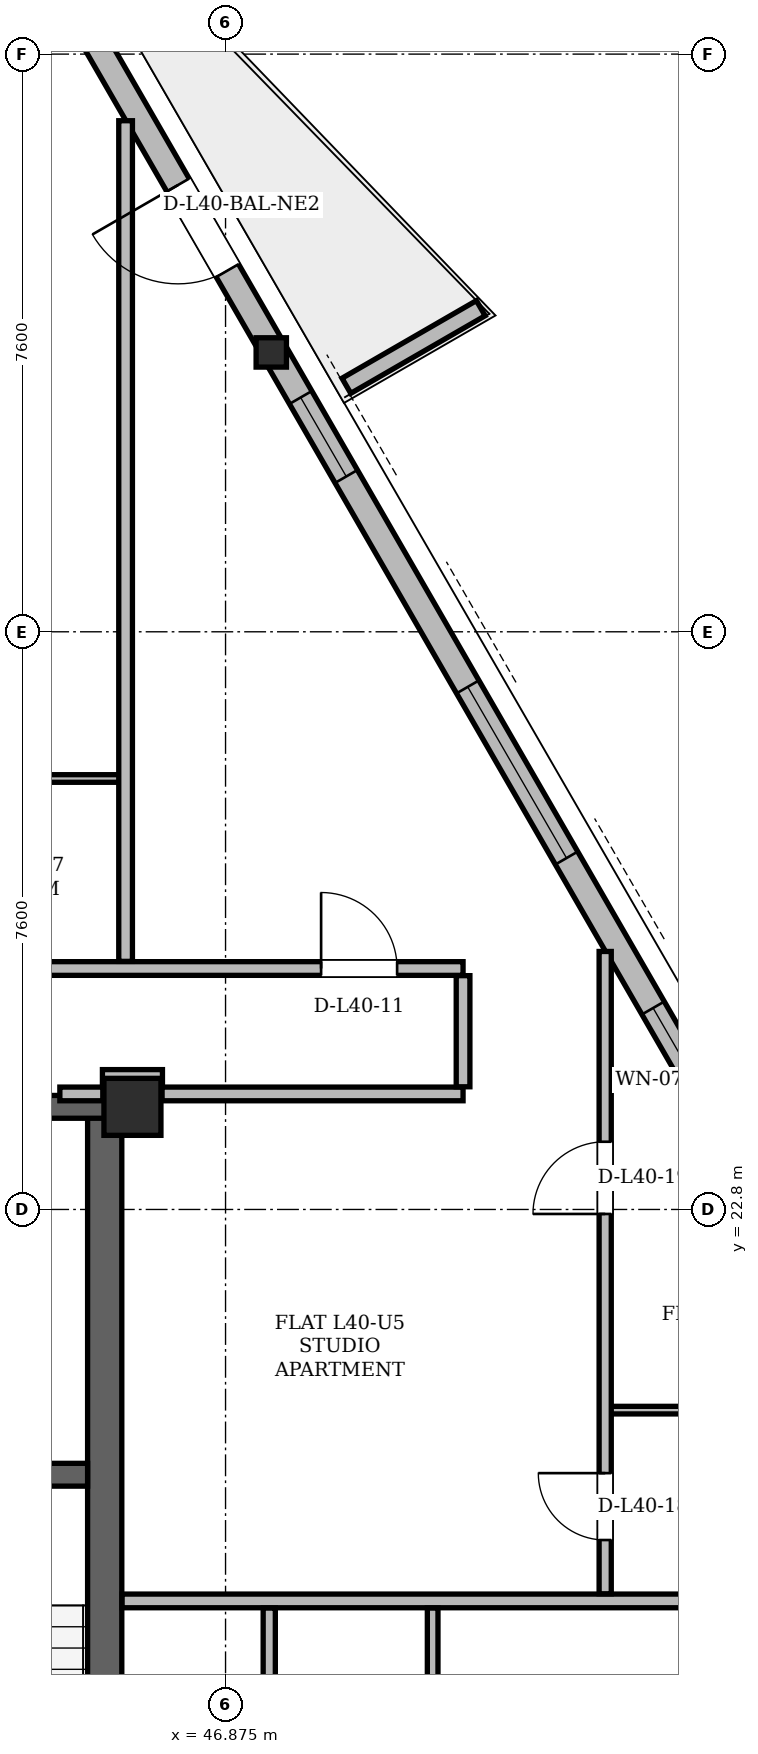
"""IFC4 building model, lengths in metres.
Left out: names, types, materials, properties, quantities, classifications, styles, units other than length and angle.
Written with IfcOpenShell. Run it as: python <this file> out.ifc"""

import sys

from ifc_helpers import new_model, si_unit, direction, frame, frame_2d, origin, origin_2d, place, context, subcontext, project, spatial, polyline, rectangle, hollow_rectangle, i_section, outline, extrude, element, fill, save


model = new_model("IFC4")
c1 = context("Model", 3, precision=1e-05, world=origin(), true_north=direction((0.0, 1.0)))
c2 = subcontext(c1, "Body", "Model", "MODEL_VIEW")
j1 = project(units=[si_unit("LENGTHUNIT", "METRE"), si_unit("PLANEANGLEUNIT", "RADIAN")], contexts=[c1])
p1 = place(None, origin())
s1 = spatial("IfcSite", under=j1, at=p1, CompositionType="ELEMENT")
p2 = place(p1, origin())
s2 = spatial("IfcBuilding", under=s1, at=p2, CompositionType="ELEMENT")
p3 = place(p2, frame((0.0, 0.0, 153.0)))
s3 = spatial("IfcBuildingStorey", under=s2, at=p3, CompositionType="ELEMENT", Elevation=153.0)
p4 = place(p3, frame((45.65, 24.15, 0.0), z_axis=(0.0, 0.0, 1.0), x_axis=(1.0, 0.0, 0.0)))
e1 = element("IfcColumn", 1, at=p4, inside=s3, PredefinedType="COLUMN", context=c2, shape_type="SweptSolid", body=[
    extrude(hollow_rectangle(XDim=0.75, YDim=0.75, WallThickness=0.06, at=origin_2d()), origin(), (0.0, 0.0, 1.0), 3.6),
])
p5 = place(p3, frame((47.513, 34.089, 0.004), z_axis=(-0.020322934204, -0.007408695078, 0.999766017417), x_axis=(0.34249983262, -0.939517889481, 0.0)))
e2 = element("IfcColumn", 2, at=p5, inside=s3, PredefinedType="COLUMN", context=c2, shape_type="SweptSolid", body=[
    extrude(i_section(OverallWidth=0.399, OverallDepth=0.386, WebThickness=0.021, FlangeThickness=0.033, at=origin_2d()), origin(), (0.0, 0.0, 1.0), 3.592),
])
p6 = place(p3, frame((45.285, 11.0, 0.0), z_axis=(0.0, 0.0, 1.0), x_axis=(0.0, 1.0, 0.0)))
e3 = element("IfcWall", 3, at=p6, inside=s3, PredefinedType="SHEAR", context=c2, shape_type="SweptSolid", body=[
    extrude(rectangle(XDim=13.3, YDim=0.45, at=frame_2d((6.65, 0.0))), origin(), (0.0, 0.0, 1.0), 3.38),
])
p7 = place(p3, frame((29.65, 24.15, 0.0), z_axis=(0.0, 0.0, 1.0), x_axis=(1.0, 0.0, 0.0)))
e4 = element("IfcWall", 4, at=p7, inside=s3, PredefinedType="SHEAR", context=c2, shape_type="SweptSolid", body=[
    extrude(rectangle(XDim=15.7, YDim=0.3, at=frame_2d((7.85, 0.0))), origin(), (0.0, 0.0, 1.0), 3.38),
])
p8 = place(p7, frame((1.7, 0.0, 0.0)))
e5 = element("IfcOpeningElement", 5, at=p8, cuts=e4, PredefinedType="OPENING", context=c2, shape_type="SweptSolid", body=[
    extrude(rectangle(XDim=1.2, YDim=2.2, at=frame_2d((0.6, 1.1))), frame((0.0, 0.15, 0.0), z_axis=(0.0, -1.0, 0.0), x_axis=(1.0, 0.0, 0.0)), (0.0, 0.0, 1.0), 0.3),
])
p9 = place(p7, frame((12.8, 0.0, 0.0)))
e6 = element("IfcOpeningElement", 6, at=p9, cuts=e4, PredefinedType="OPENING", context=c2, shape_type="SweptSolid", body=[
    extrude(rectangle(XDim=1.2, YDim=2.2, at=frame_2d((0.6, 1.1))), frame((0.0, 0.15, 0.0), z_axis=(0.0, -1.0, 0.0), x_axis=(1.0, 0.0, 0.0)), (0.0, 0.0, 1.0), 0.3),
])
p10 = place(p7, frame((6.55, 0.0, 0.0)))
e7 = element("IfcOpeningElement", 7, at=p10, cuts=e4, PredefinedType="OPENING", context=c2, shape_type="SweptSolid", body=[
    extrude(rectangle(XDim=0.9, YDim=2.05, at=frame_2d((0.45, 1.025))), frame((0.0, 0.15, 0.0), z_axis=(0.0, -1.0, 0.0), x_axis=(1.0, 0.0, 0.0)), (0.0, 0.0, 1.0), 0.3),
])
p11 = place(p7, frame((8.45, 0.0, 0.0)))
e8 = element("IfcOpeningElement", 8, at=p11, cuts=e4, PredefinedType="OPENING", context=c2, shape_type="SweptSolid", body=[
    extrude(rectangle(XDim=0.9, YDim=2.05, at=frame_2d((0.45, 1.025))), frame((0.0, 0.15, 0.0), z_axis=(0.0, -1.0, 0.0), x_axis=(1.0, 0.0, 0.0)), (0.0, 0.0, 1.0), 0.3),
])
p12 = place(p3, frame((41.05, 19.31, 0.0), z_axis=(0.0, 0.0, 1.0), x_axis=(1.0, 0.0, 0.0)))
e9 = element("IfcWall", 9, at=p12, inside=s3, PredefinedType="SHEAR", context=c2, shape_type="SweptSolid", body=[
    extrude(rectangle(XDim=4.01, YDim=0.3, at=frame_2d((2.005, 0.0))), origin(), (0.0, 0.0, 1.0), 3.38),
])
p13 = place(p12, frame((1.6, 0.0, 0.0)))
e10 = element("IfcOpeningElement", 10, at=p13, cuts=e9, PredefinedType="OPENING", context=c2, shape_type="SweptSolid", body=[
    extrude(rectangle(XDim=1.4, YDim=2.2, at=frame_2d((0.7, 1.1))), frame((0.0, 0.15, 0.0), z_axis=(0.0, -1.0, 0.0), x_axis=(1.0, 0.0, 0.0)), (0.0, 0.0, 1.0), 0.3),
])
p14 = place(p3, frame((59.952, 12.544, 0.0), z_axis=(0.0, 0.0, 1.0), x_axis=(-0.500000946011, 0.866024857604, 0.0)))
e11 = element("IfcWall", 11, at=p14, inside=s3, PredefinedType="SOLIDWALL", context=c2, shape_type="SweptSolid", body=[
    extrude(rectangle(XDim=35.54, YDim=0.34, at=frame_2d((17.77, 0.0))), origin(), (0.0, 0.0, 1.0), 2.6),
])
p15 = place(p14, frame((6.579, 0.0, 0.0)))
e12 = element("IfcOpeningElement", 12, at=p15, cuts=e11, PredefinedType="OPENING", context=c2, shape_type="SweptSolid", body=[
    extrude(rectangle(XDim=1.5, YDim=2.2, at=frame_2d((0.75, 1.1))), frame((0.0, 0.17, 0.0), z_axis=(0.0, -1.0, 0.0), x_axis=(1.0, 0.0, 0.0)), (0.0, 0.0, 1.0), 0.34),
])
p16 = place(p14, frame((26.105, 0.0, 0.0)))
e13 = element("IfcOpeningElement", 13, at=p16, cuts=e11, PredefinedType="OPENING", context=c2, shape_type="SweptSolid", body=[
    extrude(rectangle(XDim=1.3, YDim=2.2, at=frame_2d((0.65, 1.1))), frame((0.0, 0.17, 0.0), z_axis=(0.0, -1.0, 0.0), x_axis=(1.0, 0.0, 0.0)), (0.0, 0.0, 1.0), 0.34),
])
p17 = place(p14, frame((0.816, 0.0, 0.85)))
e14 = element("IfcOpeningElement", 14, at=p17, cuts=e11, PredefinedType="OPENING", context=c2, shape_type="SweptSolid", body=[
    extrude(rectangle(XDim=1.2, YDim=1.48, at=frame_2d((0.6, 0.74))), frame((0.0, 0.17, 0.0), z_axis=(0.0, -1.0, 0.0), x_axis=(1.0, 0.0, 0.0)), (0.0, 0.0, 1.0), 0.34),
])
p18 = place(p14, frame((17.181, 0.0, 0.85)))
e15 = element("IfcOpeningElement", 15, at=p18, cuts=e11, PredefinedType="OPENING", context=c2, shape_type="SweptSolid", body=[
    extrude(rectangle(XDim=2.6, YDim=1.64, at=frame_2d((1.3, 0.82))), frame((0.0, 0.17, 0.0), z_axis=(0.0, -1.0, 0.0), x_axis=(1.0, 0.0, 0.0)), (0.0, 0.0, 1.0), 0.34),
])
p19 = place(p14, frame((22.978, 0.0, 0.85)))
e16 = element("IfcOpeningElement", 16, at=p19, cuts=e11, PredefinedType="OPENING", context=c2, shape_type="SweptSolid", body=[
    extrude(rectangle(XDim=1.2, YDim=1.48, at=frame_2d((0.6, 0.74))), frame((0.0, 0.17, 0.0), z_axis=(0.0, -1.0, 0.0), x_axis=(1.0, 0.0, 0.0)), (0.0, 0.0, 1.0), 0.34),
])
p20 = place(p14, frame((13.303, 0.0, 0.85)))
e17 = element("IfcOpeningElement", 17, at=p20, cuts=e11, PredefinedType="OPENING", context=c2, shape_type="SweptSolid", body=[
    extrude(rectangle(XDim=1.6, YDim=1.64, at=frame_2d((0.8, 0.82))), frame((0.0, 0.17, 0.0), z_axis=(0.0, -1.0, 0.0), x_axis=(1.0, 0.0, 0.0)), (0.0, 0.0, 1.0), 0.34),
])
p21 = place(p14, frame((31.32, 0.0, 0.85)))
e18 = element("IfcOpeningElement", 18, at=p21, cuts=e11, PredefinedType="OPENING", context=c2, shape_type="SweptSolid", body=[
    extrude(rectangle(XDim=3.0, YDim=1.64, at=frame_2d((1.5, 0.82))), frame((0.0, 0.17, 0.0), z_axis=(0.0, -1.0, 0.0), x_axis=(1.0, 0.0, 0.0)), (0.0, 0.0, 1.0), 0.34),
])
p22 = place(p3, frame((48.465, 33.636, 0.0), z_axis=(0.0, 0.0, 1.0), x_axis=(0.866012356593, 0.500022597718, 0.0)))
e19 = element("IfcWall", 19, at=p22, inside=s3, PredefinedType="PARAPET", context=c2, shape_type="SweptSolid", body=[
    extrude(outline(polyline([(0.0, 0.0), (2.042, 0.0), (2.042, 1.1), (0.0, 1.32), (0.0, 0.0)])), frame((0.0, 0.115, 0.0), z_axis=(0.0, -1.0, 0.0), x_axis=(1.0, 0.0, 0.0)), (0.0, 0.0, 1.0), 0.23),
])
p23 = place(p3, frame((45.514, 17.65, 0.0), z_axis=(0.0, 0.0, 1.0), x_axis=(1.0, 0.0, 0.0)))
e20 = element("IfcWall", 20, at=p23, inside=s3, PredefinedType="PARTITIONING", context=c2, shape_type="SweptSolid", body=[
    extrude(rectangle(XDim=11.289, YDim=0.18, at=frame_2d((5.645, 0.0))), origin(), (0.0, 0.0, 1.0), 2.42),
])
p24 = place(p3, frame((51.872, 20.16, 0.0), z_axis=(0.0, 0.0, 1.0), x_axis=(1.0, 0.0, 0.0)))
e21 = element("IfcWall", 21, at=p24, inside=s3, PredefinedType="PARTITIONING", context=c2, shape_type="SweptSolid", body=[
    extrude(rectangle(XDim=3.482, YDim=0.1, at=frame_2d((1.741, 0.0))), origin(), (0.0, 0.0, 1.0), 3.38),
])
p25 = place(p3, frame((44.695, 24.32, 0.0), z_axis=(0.0, 0.0, 1.0), x_axis=(1.0, 0.0, 0.0)))
e22 = element("IfcWall", 22, at=p25, inside=s3, PredefinedType="PARTITIONING", context=c2, shape_type="SweptSolid", body=[
    extrude(rectangle(XDim=0.565, YDim=0.18, at=frame_2d((0.282, 0.0))), origin(), (0.0, 0.0, 1.0), 2.42),
])
p26 = place(p3, frame((46.04, 24.32, 0.0), z_axis=(0.0, 0.0, 1.0), x_axis=(1.0, 0.0, 0.0)))
e23 = element("IfcWall", 23, at=p26, inside=s3, PredefinedType="PARTITIONING", context=c2, shape_type="SweptSolid", body=[
    extrude(rectangle(XDim=3.96, YDim=0.18, at=frame_2d((1.98, 0.0))), origin(), (0.0, 0.0, 1.0), 3.38),
])
p27 = place(p3, frame((45.255, 24.55, 0.0), z_axis=(0.0, 0.0, 1.0), x_axis=(1.0, 0.0, 0.0)))
e24 = element("IfcWall", 24, at=p27, inside=s3, PredefinedType="PARTITIONING", context=c2, shape_type="SweptSolid", body=[
    extrude(rectangle(XDim=0.79, YDim=0.18, at=frame_2d((0.395, 0.0))), origin(), (0.0, 0.0, 1.0), 2.842),
])
p28 = place(p3, frame((38.3, 25.97, 0.0), z_axis=(0.0, 0.0, 1.0), x_axis=(1.0, 0.0, 0.0)))
e25 = element("IfcWall", 25, at=p28, inside=s3, PredefinedType="PARTITIONING", context=c2, shape_type="SweptSolid", body=[
    extrude(rectangle(XDim=11.7, YDim=0.18, at=frame_2d((5.85, 0.0))), origin(), (0.0, 0.0, 1.0), 2.842),
])
p29 = place(p28, frame((9.832, 0.0, 0.0)))
e26 = element("IfcOpeningElement", 26, at=p29, cuts=e25, PredefinedType="OPENING", context=c2, shape_type="SweptSolid", body=[
    extrude(rectangle(XDim=1.0, YDim=2.18, at=frame_2d((0.5, 1.09))), frame((0.0, 0.09, 0.0), z_axis=(0.0, -1.0, 0.0), x_axis=(1.0, 0.0, 0.0)), (0.0, 0.0, 1.0), 0.18),
])
p30 = place(p3, frame((38.218, 28.47, 0.0), z_axis=(0.0, 0.0, 1.0), x_axis=(1.0, 0.0, 0.0)))
e27 = element("IfcWall", 27, at=p30, inside=s3, PredefinedType="PARTITIONING", context=c2, shape_type="SweptSolid", body=[
    extrude(rectangle(XDim=7.424, YDim=0.1, at=frame_2d((3.712, 0.0))), origin(), (0.0, 0.0, 1.0), 3.38),
])
p31 = place(p30, frame((3.272, 0.0, 0.0)))
e28 = element("IfcOpeningElement", 28, at=p31, cuts=e27, PredefinedType="OPENING", context=c2, shape_type="SweptSolid", body=[
    extrude(rectangle(XDim=0.88, YDim=2.08, at=frame_2d((0.44, 1.04))), frame((0.0, 0.05, 0.0), z_axis=(0.0, -1.0, 0.0), x_axis=(1.0, 0.0, 0.0)), (0.0, 0.0, 1.0), 0.1),
])
p32 = place(p3, frame((45.56, 26.064, 0.0), z_axis=(0.0, 0.0, 1.0), x_axis=(0.0, 1.0, 0.0)))
e29 = element("IfcWall", 29, at=p32, inside=s3, PredefinedType="PARTITIONING", context=c2, shape_type="SweptSolid", body=[
    extrude(rectangle(XDim=11.06, YDim=0.18, at=frame_2d((5.53, 0.0))), origin(), (0.0, 0.0, 1.0), 3.38),
])
p33 = place(p3, frame((47.45, 13.004, 0.0), z_axis=(0.0, 0.0, 1.0), x_axis=(0.0, 1.0, 0.0)))
e30 = element("IfcWall", 30, at=p33, inside=s3, PredefinedType="PARTITIONING", context=c2, shape_type="SweptSolid", body=[
    extrude(rectangle(XDim=4.552, YDim=0.16, at=frame_2d((2.276, 0.0))), origin(), (0.0, 0.0, 1.0), 3.38),
])
p34 = place(p3, frame((49.6, 13.004, 0.0), z_axis=(0.0, 0.0, 1.0), x_axis=(0.0, 1.0, 0.0)))
e31 = element("IfcWall", 31, at=p34, inside=s3, PredefinedType="PARTITIONING", context=c2, shape_type="SweptSolid", body=[
    extrude(rectangle(XDim=4.552, YDim=0.14, at=frame_2d((2.276, 0.0))), origin(), (0.0, 0.0, 1.0), 3.38),
])
p35 = place(p3, frame((50.0, 24.414, 0.0), z_axis=(0.0, 0.0, 1.0), x_axis=(0.0, 1.0, 0.0)))
e32 = element("IfcWall", 32, at=p35, inside=s3, PredefinedType="PARTITIONING", context=c2, shape_type="SweptSolid", body=[
    extrude(rectangle(XDim=1.462, YDim=0.18, at=frame_2d((0.731, 0.0))), origin(), (0.0, 0.0, 1.0), 3.38),
])
p36 = place(p3, frame((51.87, 17.744, 0.0), z_axis=(0.0, 0.0, 1.0), x_axis=(0.0, 1.0, 0.0)))
e33 = element("IfcWall", 33, at=p36, inside=s3, PredefinedType="PARTITIONING", context=c2, shape_type="SweptSolid", body=[
    extrude(rectangle(XDim=8.45, YDim=0.16, at=frame_2d((4.225, 0.0))), origin(), (0.0, 0.0, 1.0), 3.38),
])
p37 = place(p36, frame((0.707, 0.0, 0.0)))
e34 = element("IfcOpeningElement", 34, at=p37, cuts=e33, PredefinedType="OPENING", context=c2, shape_type="SweptSolid", body=[
    extrude(rectangle(XDim=0.88, YDim=2.08, at=frame_2d((0.44, 1.04))), frame((0.0, 0.08, 0.0), z_axis=(0.0, -1.0, 0.0), x_axis=(1.0, 0.0, 0.0)), (0.0, 0.0, 1.0), 0.16),
])
p38 = place(p36, frame((4.997, 0.0, 0.0)))
e35 = element("IfcOpeningElement", 35, at=p38, cuts=e33, PredefinedType="OPENING", context=c2, shape_type="SweptSolid", body=[
    extrude(rectangle(XDim=0.95, YDim=2.1, at=frame_2d((0.475, 1.05))), frame((0.0, 0.08, 0.0), z_axis=(0.0, -1.0, 0.0), x_axis=(1.0, 0.0, 0.0)), (0.0, 0.0, 1.0), 0.16),
])
p39 = place(p16, origin())
e36 = element("IfcDoor", 36, at=p39, inside=s3, OperationType="SINGLE_SWING_RIGHT", PredefinedType="DOOR", context=c2, shape_type="SweptSolid", body=[
    extrude(rectangle(XDim=1.3, YDim=2.2, at=frame_2d((0.65, 1.1))), frame((0.0, 0.025, 0.0), z_axis=(0.0, -1.0, 0.0), x_axis=(1.0, 0.0, 0.0)), (0.0, 0.0, 1.0), 0.05),
])
fill(e13, e36)
p40 = place(p18, origin())
e37 = element("IfcWindow", 37, at=p40, inside=s3, PartitioningType="SINGLE_PANEL", PredefinedType="WINDOW", context=c2, shape_type="SweptSolid", body=[
    extrude(rectangle(XDim=2.6, YDim=1.64, at=frame_2d((1.3, 0.82))), frame((0.0, 0.03, 0.0), z_axis=(0.0, -1.0, 0.0), x_axis=(1.0, 0.0, 0.0)), (0.0, 0.0, 1.0), 0.06),
])
fill(e15, e37)
p41 = place(p19, origin())
e38 = element("IfcWindow", 38, at=p41, inside=s3, PartitioningType="SINGLE_PANEL", PredefinedType="WINDOW", context=c2, shape_type="SweptSolid", body=[
    extrude(rectangle(XDim=1.2, YDim=1.48, at=frame_2d((0.6, 0.74))), frame((0.0, 0.03, 0.0), z_axis=(0.0, -1.0, 0.0), x_axis=(1.0, 0.0, 0.0)), (0.0, 0.0, 1.0), 0.06),
])
fill(e16, e38)
p42 = place(p20, origin())
e39 = element("IfcWindow", 39, at=p42, inside=s3, PartitioningType="SINGLE_PANEL", PredefinedType="WINDOW", context=c2, shape_type="SweptSolid", body=[
    extrude(rectangle(XDim=1.6, YDim=1.64, at=frame_2d((0.8, 0.82))), frame((0.0, 0.03, 0.0), z_axis=(0.0, -1.0, 0.0), x_axis=(1.0, 0.0, 0.0)), (0.0, 0.0, 1.0), 0.06),
])
fill(e17, e39)
p43 = place(p29, origin())
e40 = element("IfcDoor", 40, at=p43, inside=s3, OperationType="SINGLE_SWING_LEFT", PredefinedType="DOOR", context=c2, shape_type="SweptSolid", body=[
    extrude(rectangle(XDim=1.0, YDim=2.18, at=frame_2d((0.5, 1.09))), frame((0.0, 0.025, 0.0), z_axis=(0.0, -1.0, 0.0), x_axis=(1.0, 0.0, 0.0)), (0.0, 0.0, 1.0), 0.05),
])
fill(e26, e40)
p44 = place(p37, origin())
e41 = element("IfcDoor", 41, at=p44, inside=s3, OperationType="SINGLE_SWING_RIGHT", PredefinedType="DOOR", context=c2, shape_type="SweptSolid", body=[
    extrude(rectangle(XDim=0.88, YDim=2.08, at=frame_2d((0.44, 1.04))), frame((0.0, 0.025, 0.0), z_axis=(0.0, -1.0, 0.0), x_axis=(1.0, 0.0, 0.0)), (0.0, 0.0, 1.0), 0.05),
])
fill(e34, e41)
p45 = place(p38, origin())
e42 = element("IfcDoor", 42, at=p45, inside=s3, OperationType="SINGLE_SWING_LEFT", PredefinedType="DOOR", context=c2, shape_type="SweptSolid", body=[
    extrude(rectangle(XDim=0.95, YDim=2.1, at=frame_2d((0.475, 1.05))), frame((0.0, 0.025, 0.0), z_axis=(0.0, -1.0, 0.0), x_axis=(1.0, 0.0, 0.0)), (0.0, 0.0, 1.0), 0.05),
])
fill(e35, e42)
save(model, sys.argv[1])
